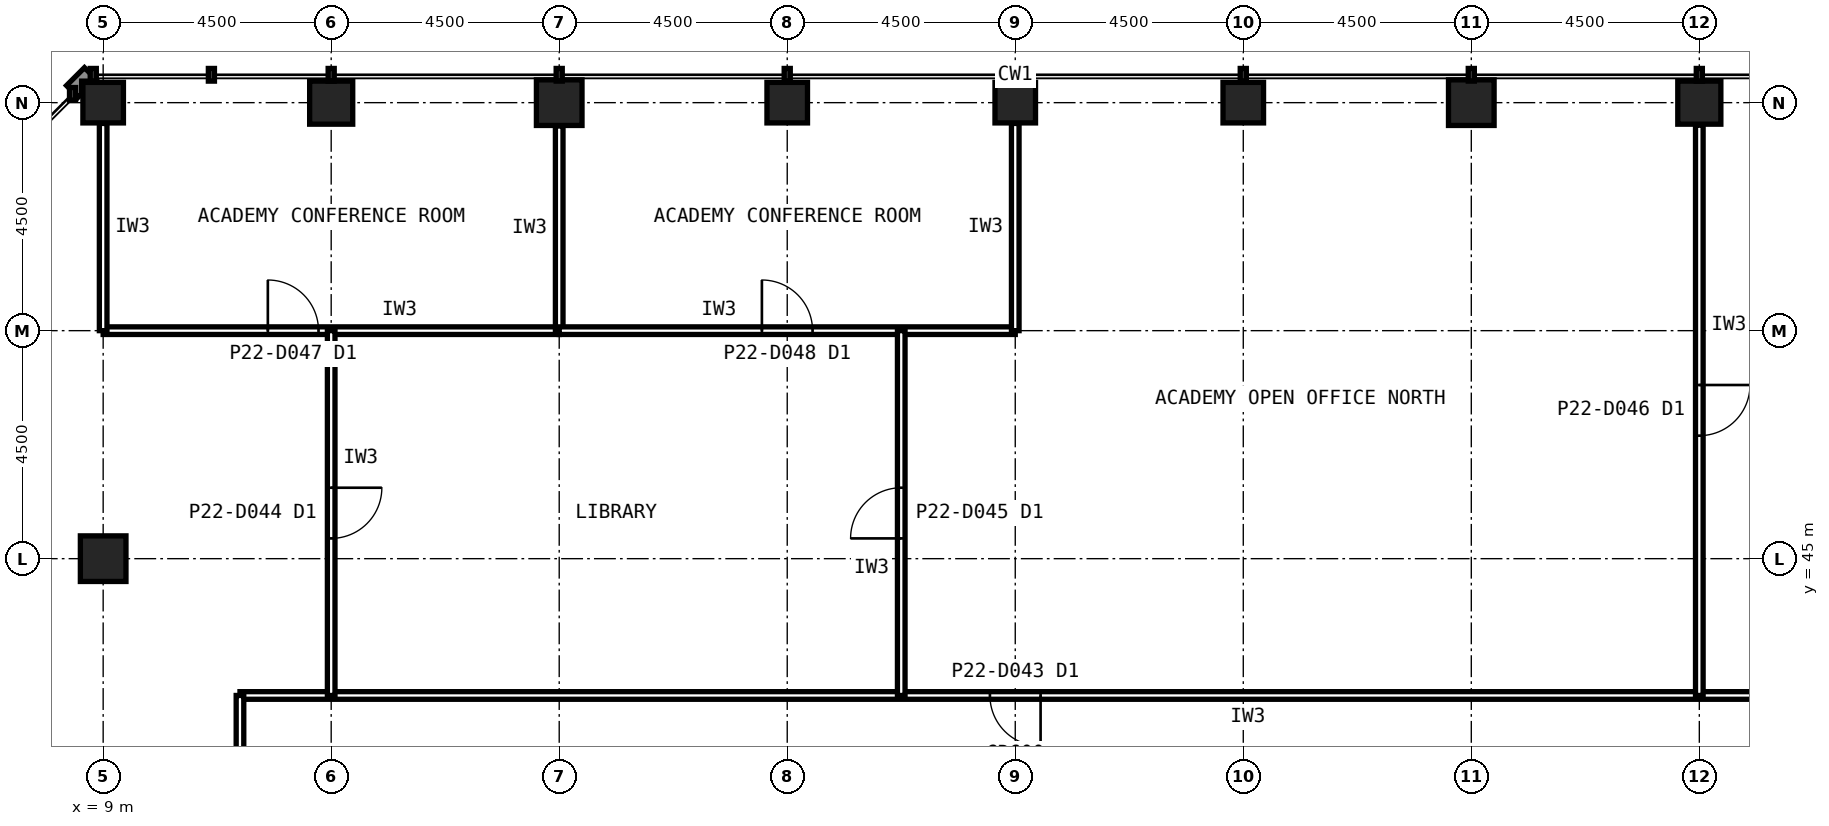
"""IFC4 building model, lengths in metres.
Left out: names, types, materials, properties, quantities, classifications, styles, units other than length and angle.
Written with IfcOpenShell. Run it as: python <this file> out.ifc"""

import sys

from ifc_helpers import new_model, si_unit, direction, frame, frame_2d, origin, origin_2d, place, context, subcontext, project, spatial, rectangle, hollow_rectangle, extrude, element, fill, save


model = new_model("IFC4")
c1 = context("Model", 3, precision=1e-05, world=origin(), true_north=direction((0.0, 1.0)))
c2 = subcontext(c1, "Body", "Model", "MODEL_VIEW")
j1 = project(units=[si_unit("LENGTHUNIT", "METRE"), si_unit("PLANEANGLEUNIT", "RADIAN")], contexts=[c1])
p1 = place(None, origin())
s1 = spatial("IfcSite", under=j1, at=p1, CompositionType="ELEMENT")
p2 = place(p1, origin())
s2 = spatial("IfcBuilding", under=s1, at=p2, CompositionType="ELEMENT")
p3 = place(p2, frame((0.0, 0.0, 96.2)))
s3 = spatial("IfcBuildingStorey", under=s2, at=p3, CompositionType="ELEMENT", Elevation=96.2)
p4 = place(p3, frame((40.5, 54.0, 0.0), z_axis=(0.0, 0.0, 1.0), x_axis=(1.0, 0.0, 0.0)))
e1 = element("IfcColumn", 1, at=p4, inside=s3, PredefinedType="COLUMN", context=c2, shape_type="SweptSolid", body=[
    extrude(hollow_rectangle(XDim=0.85, YDim=0.85, WallThickness=0.05, at=origin_2d()), origin(), (0.0, 0.0, 1.0), 4.2),
])
p5 = place(p3, frame((36.0, 54.0, 0.0), z_axis=(0.0, 0.0, 1.0), x_axis=(1.0, 0.0, 0.0)))
e2 = element("IfcColumn", 2, at=p5, inside=s3, PredefinedType="COLUMN", context=c2, shape_type="SweptSolid", body=[
    extrude(hollow_rectangle(XDim=0.9, YDim=0.9, WallThickness=0.063, at=origin_2d()), origin(), (0.0, 0.0, 1.0), 4.2),
])
for number, where, z_axis, x_axis in (
    (3, (31.5, 54.0, 0.0), (0.0, 0.0, 1.0), (1.0, 0.0, 0.0)),
    (4, (27.0, 54.0, 0.0), (0.0, 0.0, 1.0), (1.0, 0.0, 0.0)),
    (5, (22.5, 54.0, 0.0), (0.0, 0.0, 1.0), (1.0, 0.0, 0.0)),
):
    element("IfcColumn", number, at=place(p3, frame(where, z_axis=z_axis, x_axis=x_axis)), inside=s3, PredefinedType="COLUMN", context=c2, shape_type="SweptSolid", body=[
        extrude(hollow_rectangle(XDim=0.8, YDim=0.8, WallThickness=0.045, at=origin_2d()), origin(), (0.0, 0.0, 1.0), 4.2),
    ])
p6 = place(p3, frame((18.0, 54.0, 0.0), z_axis=(0.0, 0.0, 1.0), x_axis=(1.0, 0.0, 0.0)))
e6 = element("IfcColumn", 6, at=p6, inside=s3, PredefinedType="COLUMN", context=c2, shape_type="SweptSolid", body=[
    extrude(hollow_rectangle(XDim=0.9, YDim=0.9, WallThickness=0.063, at=origin_2d()), origin(), (0.0, 0.0, 1.0), 4.2),
])
p7 = place(p3, frame((13.5, 54.0, 0.0), z_axis=(0.0, 0.0, 1.0), x_axis=(1.0, 0.0, 0.0)))
e7 = element("IfcColumn", 7, at=p7, inside=s3, PredefinedType="COLUMN", context=c2, shape_type="SweptSolid", body=[
    extrude(hollow_rectangle(XDim=0.85, YDim=0.85, WallThickness=0.05, at=origin_2d()), origin(), (0.0, 0.0, 1.0), 4.2),
])
p8 = place(p3, frame((9.0, 54.0, 0.0), z_axis=(0.0, 0.0, 1.0), x_axis=(1.0, 0.0, 0.0)))
e8 = element("IfcColumn", 8, at=p8, inside=s3, PredefinedType="COLUMN", context=c2, shape_type="SweptSolid", body=[
    extrude(hollow_rectangle(XDim=0.8, YDim=0.8, WallThickness=0.045, at=origin_2d()), origin(), (0.0, 0.0, 1.0), 4.2),
])
p9 = place(p3, frame((9.0, 45.0, 0.0), z_axis=(0.0, 0.0, 1.0), x_axis=(1.0, 0.0, 0.0)))
e9 = element("IfcColumn", 9, at=p9, inside=s3, PredefinedType="COLUMN", context=c2, shape_type="SweptSolid", body=[
    extrude(hollow_rectangle(XDim=0.9, YDim=0.9, WallThickness=0.063, at=origin_2d()), origin(), (0.0, 0.0, 1.0), 4.2),
])
p10 = place(p3, frame((42.3, 42.3, 0.0), z_axis=(0.0, 0.0, 1.0), x_axis=(-1.0, 0.0, 0.0)))
e10 = element("IfcWall", 10, at=p10, inside=s3, PredefinedType="PARTITIONING", context=c2, shape_type="SweptSolid", body=[
    extrude(rectangle(XDim=30.6, YDim=0.15, at=frame_2d((15.3, 0.0))), origin(), (0.0, 0.0, 1.0), 4.04),
])
p11 = place(p10, frame((14.8, 0.0, 0.0)))
e11 = element("IfcOpeningElement", 11, at=p11, cuts=e10, PredefinedType="OPENING", context=c2, shape_type="SweptSolid", body=[
    extrude(rectangle(XDim=1.0, YDim=2.1, at=frame_2d((0.5, 1.05))), frame((0.0, 0.085, 0.0), z_axis=(0.0, -1.0, 0.0), x_axis=(1.0, 0.0, 0.0)), (0.0, 0.0, 1.0), 0.17),
])
p12 = place(p3, frame((11.7, 42.3, 0.0), z_axis=(0.0, 0.0, 1.0), x_axis=(0.0, -1.0, 0.0)))
e12 = element("IfcWall", 12, at=p12, inside=s3, PredefinedType="PARTITIONING", context=c2, shape_type="SweptSolid", body=[
    extrude(rectangle(XDim=9.0, YDim=0.15, at=frame_2d((4.5, 0.0))), origin(), (0.0, 0.0, 1.0), 4.04),
])
p13 = place(p3, frame((9.0, 49.5, 0.0), z_axis=(0.0, 0.0, 1.0), x_axis=(1.0, 0.0, 0.0)))
e13 = element("IfcWall", 13, at=p13, inside=s3, PredefinedType="PARTITIONING", context=c2, shape_type="SweptSolid", body=[
    extrude(rectangle(XDim=9.0, YDim=0.15, at=frame_2d((4.5, 0.0))), origin(), (0.0, 0.0, 1.0), 4.04),
])
p14 = place(p13, frame((3.25, 0.0, 0.0)))
e14 = element("IfcOpeningElement", 14, at=p14, cuts=e13, PredefinedType="OPENING", context=c2, shape_type="SweptSolid", body=[
    extrude(rectangle(XDim=1.0, YDim=2.1, at=frame_2d((0.5, 1.05))), frame((0.0, 0.085, 0.0), z_axis=(0.0, -1.0, 0.0), x_axis=(1.0, 0.0, 0.0)), (0.0, 0.0, 1.0), 0.17),
])
p15 = place(p3, frame((18.0, 49.5, 0.0), z_axis=(0.0, 0.0, 1.0), x_axis=(0.0, 1.0, 0.0)))
e15 = element("IfcWall", 15, at=p15, inside=s3, PredefinedType="PARTITIONING", context=c2, shape_type="SweptSolid", body=[
    extrude(rectangle(XDim=4.04, YDim=0.15, at=frame_2d((2.02, 0.0))), origin(), (0.0, 0.0, 1.0), 3.189),
])
p16 = place(p3, frame((9.0, 53.59, 0.0), z_axis=(0.0, 0.0, 1.0), x_axis=(0.0, -1.0, 0.0)))
e16 = element("IfcWall", 16, at=p16, inside=s3, PredefinedType="PARTITIONING", context=c2, shape_type="SweptSolid", body=[
    extrude(rectangle(XDim=4.09, YDim=0.15, at=frame_2d((2.045, 0.0))), origin(), (0.0, 0.0, 1.0), 3.429),
])
p17 = place(p3, frame((18.0, 49.5, 0.0), z_axis=(0.0, 0.0, 1.0), x_axis=(1.0, 0.0, 0.0)))
e17 = element("IfcWall", 17, at=p17, inside=s3, PredefinedType="PARTITIONING", context=c2, shape_type="SweptSolid", body=[
    extrude(rectangle(XDim=9.0, YDim=0.15, at=frame_2d((4.5, 0.0))), origin(), (0.0, 0.0, 1.0), 4.04),
])
p18 = place(p17, frame((4.0, 0.0, 0.0)))
e18 = element("IfcOpeningElement", 18, at=p18, cuts=e17, PredefinedType="OPENING", context=c2, shape_type="SweptSolid", body=[
    extrude(rectangle(XDim=1.0, YDim=2.1, at=frame_2d((0.5, 1.05))), frame((0.0, 0.085, 0.0), z_axis=(0.0, -1.0, 0.0), x_axis=(1.0, 0.0, 0.0)), (0.0, 0.0, 1.0), 0.17),
])
p19 = place(p3, frame((27.0, 49.5, 0.0), z_axis=(0.0, 0.0, 1.0), x_axis=(0.0, 1.0, 0.0)))
e19 = element("IfcWall", 19, at=p19, inside=s3, PredefinedType="PARTITIONING", context=c2, shape_type="SweptSolid", body=[
    extrude(rectangle(XDim=4.09, YDim=0.15, at=frame_2d((2.045, 0.0))), origin(), (0.0, 0.0, 1.0), 3.189),
])
p20 = place(p3, frame((40.5, 53.555, 0.0), z_axis=(0.0, 0.0, 1.0), x_axis=(0.0, -1.0, 0.0)))
e20 = element("IfcWall", 20, at=p20, inside=s3, PredefinedType="PARTITIONING", context=c2, shape_type="SweptSolid", body=[
    extrude(rectangle(XDim=11.255, YDim=0.15, at=frame_2d((5.627, 0.0))), origin(), (0.0, 0.0, 1.0), 3.189),
])
p21 = place(p20, frame((5.127, 0.0, 0.0)))
e21 = element("IfcOpeningElement", 21, at=p21, cuts=e20, PredefinedType="OPENING", context=c2, shape_type="SweptSolid", body=[
    extrude(rectangle(XDim=1.0, YDim=2.1, at=frame_2d((0.5, 1.05))), frame((0.0, 0.085, 0.0), z_axis=(0.0, -1.0, 0.0), x_axis=(1.0, 0.0, 0.0)), (0.0, 0.0, 1.0), 0.17),
])
p22 = place(p3, frame((24.75, 42.3, 0.0), z_axis=(0.0, 0.0, 1.0), x_axis=(0.0, 1.0, 0.0)))
e22 = element("IfcWall", 22, at=p22, inside=s3, PredefinedType="PARTITIONING", context=c2, shape_type="SweptSolid", body=[
    extrude(rectangle(XDim=7.2, YDim=0.15, at=frame_2d((3.6, 0.0))), origin(), (0.0, 0.0, 1.0), 4.04),
])
p23 = place(p22, frame((3.1, 0.0, 0.0)))
e23 = element("IfcOpeningElement", 23, at=p23, cuts=e22, PredefinedType="OPENING", context=c2, shape_type="SweptSolid", body=[
    extrude(rectangle(XDim=1.0, YDim=2.1, at=frame_2d((0.5, 1.05))), frame((0.0, 0.085, 0.0), z_axis=(0.0, -1.0, 0.0), x_axis=(1.0, 0.0, 0.0)), (0.0, 0.0, 1.0), 0.17),
])
p24 = place(p3, frame((13.5, 49.5, 0.0), z_axis=(0.0, 0.0, 1.0), x_axis=(0.0, -1.0, 0.0)))
e24 = element("IfcWall", 24, at=p24, inside=s3, PredefinedType="PARTITIONING", context=c2, shape_type="SweptSolid", body=[
    extrude(rectangle(XDim=7.2, YDim=0.15, at=frame_2d((3.6, 0.0))), origin(), (0.0, 0.0, 1.0), 3.189),
])
p25 = place(p24, frame((3.1, 0.0, 0.0)))
e25 = element("IfcOpeningElement", 25, at=p25, cuts=e24, PredefinedType="OPENING", context=c2, shape_type="SweptSolid", body=[
    extrude(rectangle(XDim=1.0, YDim=2.1, at=frame_2d((0.5, 1.05))), frame((0.0, 0.085, 0.0), z_axis=(0.0, -1.0, 0.0), x_axis=(1.0, 0.0, 0.0)), (0.0, 0.0, 1.0), 0.17),
])
p26 = place(p11, origin())
e26 = element("IfcDoor", 26, at=p26, inside=s3, OperationType="SINGLE_SWING_LEFT", PredefinedType="DOOR", context=c2, shape_type="SweptSolid", body=[
    extrude(rectangle(XDim=1.0, YDim=2.1, at=frame_2d((0.5, 1.05))), frame((0.0, 0.025, 0.0), z_axis=(0.0, -1.0, 0.0), x_axis=(1.0, 0.0, 0.0)), (0.0, 0.0, 1.0), 0.05),
])
fill(e11, e26)
p27 = place(p14, origin())
e27 = element("IfcDoor", 27, at=p27, inside=s3, OperationType="SINGLE_SWING_LEFT", PredefinedType="DOOR", context=c2, shape_type="SweptSolid", body=[
    extrude(rectangle(XDim=1.0, YDim=2.1, at=frame_2d((0.5, 1.05))), frame((0.0, 0.025, 0.0), z_axis=(0.0, -1.0, 0.0), x_axis=(1.0, 0.0, 0.0)), (0.0, 0.0, 1.0), 0.05),
])
fill(e14, e27)
p28 = place(p18, origin())
e28 = element("IfcDoor", 28, at=p28, inside=s3, OperationType="SINGLE_SWING_LEFT", PredefinedType="DOOR", context=c2, shape_type="SweptSolid", body=[
    extrude(rectangle(XDim=1.0, YDim=2.1, at=frame_2d((0.5, 1.05))), frame((0.0, 0.025, 0.0), z_axis=(0.0, -1.0, 0.0), x_axis=(1.0, 0.0, 0.0)), (0.0, 0.0, 1.0), 0.05),
])
fill(e18, e28)
p29 = place(p21, origin())
e29 = element("IfcDoor", 29, at=p29, inside=s3, OperationType="SINGLE_SWING_LEFT", PredefinedType="DOOR", context=c2, shape_type="SweptSolid", body=[
    extrude(rectangle(XDim=1.0, YDim=2.1, at=frame_2d((0.5, 1.05))), frame((0.0, 0.025, 0.0), z_axis=(0.0, -1.0, 0.0), x_axis=(1.0, 0.0, 0.0)), (0.0, 0.0, 1.0), 0.05),
])
fill(e21, e29)
p30 = place(p23, origin())
e30 = element("IfcDoor", 30, at=p30, inside=s3, OperationType="SINGLE_SWING_LEFT", PredefinedType="DOOR", context=c2, shape_type="SweptSolid", body=[
    extrude(rectangle(XDim=1.0, YDim=2.1, at=frame_2d((0.5, 1.05))), frame((0.0, 0.025, 0.0), z_axis=(0.0, -1.0, 0.0), x_axis=(1.0, 0.0, 0.0)), (0.0, 0.0, 1.0), 0.05),
])
fill(e23, e30)
p31 = place(p25, origin())
e31 = element("IfcDoor", 31, at=p31, inside=s3, OperationType="SINGLE_SWING_LEFT", PredefinedType="DOOR", context=c2, shape_type="SweptSolid", body=[
    extrude(rectangle(XDim=1.0, YDim=2.1, at=frame_2d((0.5, 1.05))), frame((0.0, 0.025, 0.0), z_axis=(0.0, -1.0, 0.0), x_axis=(1.0, 0.0, 0.0)), (0.0, 0.0, 1.0), 0.05),
])
fill(e25, e31)
save(model, sys.argv[1])
